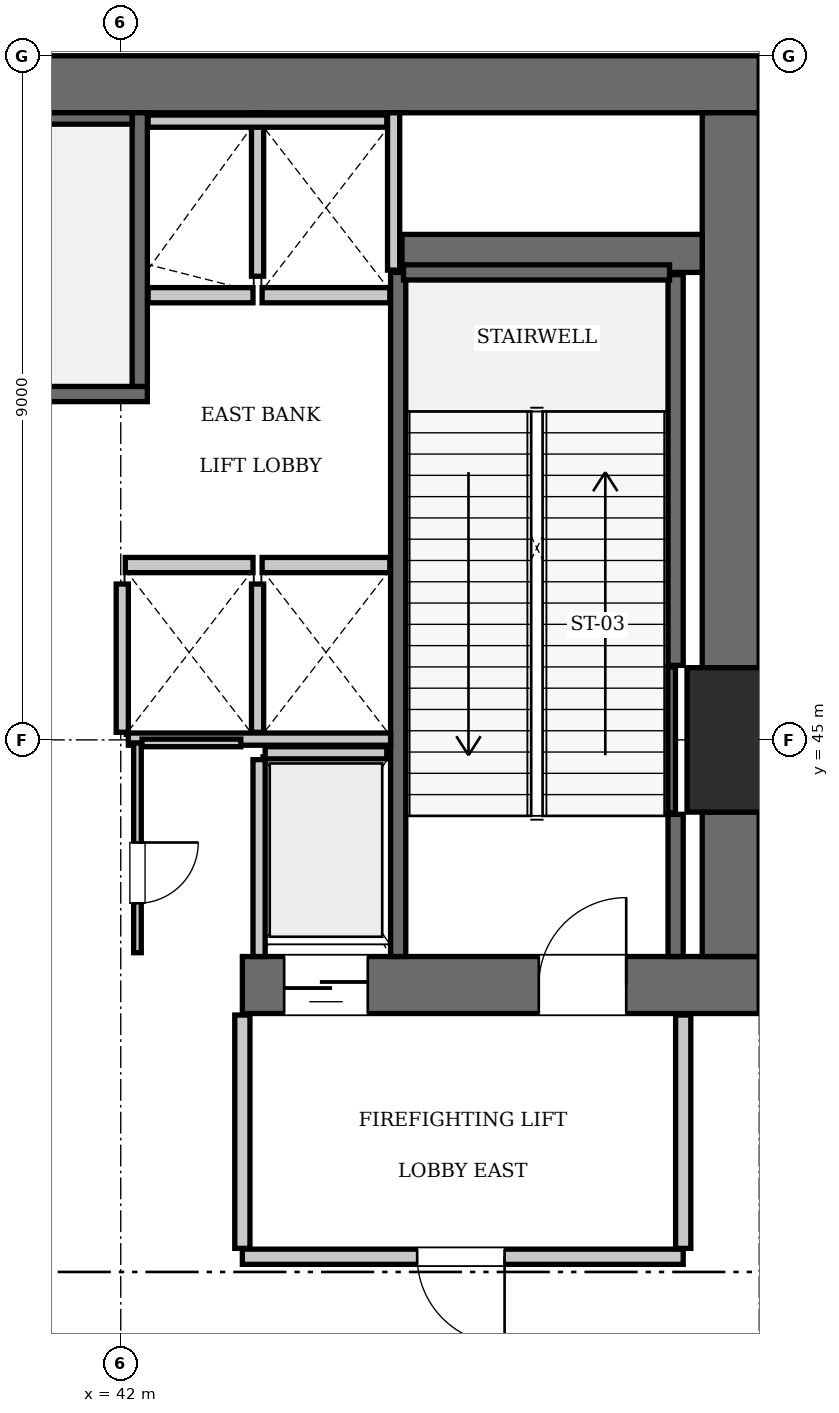
"""IFC4 building model, lengths in metres.
Left out: names, types, materials, properties, quantities, classifications, styles, units other than length and angle.
Written with IfcOpenShell. Run it as: python <this file> out.ifc"""

import sys

from ifc_helpers import new_model, si_unit, direction, frame, frame_2d, origin, origin_2d, place, context, subcontext, project, spatial, rectangle, extrude, element, fill, save


model = new_model("IFC4")
c1 = context("Model", 3, precision=1e-05, world=origin(), true_north=direction((0.0, 1.0)))
c2 = subcontext(c1, "Body", "Model", "MODEL_VIEW")
j1 = project(units=[si_unit("LENGTHUNIT", "METRE"), si_unit("PLANEANGLEUNIT", "RADIAN")], contexts=[c1])
p1 = place(None, origin())
s1 = spatial("IfcSite", under=j1, at=p1, CompositionType="ELEMENT")
p2 = place(p1, origin())
s2 = spatial("IfcBuilding", under=s1, at=p2, CompositionType="ELEMENT")
p3 = place(p2, frame((0.0, 0.0, 227.5)))
s3 = spatial("IfcBuildingStorey", under=s2, at=p3, CompositionType="ELEMENT", Elevation=227.5)
p4 = place(p3, frame((50.4, 45.0, 0.0), z_axis=(0.0, 0.0, 1.0), x_axis=(1.0, 0.0, 0.0)))
e1 = element("IfcColumn", 1, at=p4, inside=s3, PredefinedType="COLUMN", context=c2, shape_type="SweptSolid", body=[
    extrude(rectangle(XDim=1.9, YDim=1.9, at=origin_2d()), origin(), (0.0, 0.0, 1.0), 7.0),
])
p5 = place(p3, frame((25.2, 53.625, 0.0), z_axis=(0.0, 0.0, 1.0), x_axis=(1.0, 0.0, 0.0)))
e2 = element("IfcWall", 2, at=p5, inside=s3, PredefinedType="SHEAR", context=c2, shape_type="SweptSolid", body=[
    extrude(rectangle(XDim=25.2, YDim=0.75, at=frame_2d((12.6, 0.0))), origin(), (0.0, 0.0, 1.0), 7.0),
])
p6 = place(p3, frame((43.6, 41.775, 0.0), z_axis=(0.0, 0.0, 1.0), x_axis=(1.0, 0.0, 0.0)))
e3 = element("IfcWall", 3, at=p6, inside=s3, PredefinedType="SHEAR", context=c2, shape_type="SweptSolid", body=[
    extrude(rectangle(XDim=6.8, YDim=0.75, at=frame_2d((3.4, 0.0))), origin(), (0.0, 0.0, 1.0), 7.0),
])
p7 = place(p6, frame((3.9, 0.0, 0.0)))
e4 = element("IfcOpeningElement", 4, at=p7, cuts=e3, PredefinedType="OPENING", context=c2, shape_type="SweptSolid", body=[
    extrude(rectangle(XDim=1.15, YDim=2.15, at=frame_2d((0.575, 1.075))), frame((0.0, 0.385, 0.0), z_axis=(0.0, -1.0, 0.0), x_axis=(1.0, 0.0, 0.0)), (0.0, 0.0, 1.0), 0.77),
])
p8 = place(p6, frame((0.55, 0.0, 0.0)))
e5 = element("IfcOpeningElement", 5, at=p8, cuts=e3, PredefinedType="OPENING", context=c2, shape_type="SweptSolid", body=[
    extrude(rectangle(XDim=1.1, YDim=2.2, at=frame_2d((0.55, 1.1))), frame((0.0, 0.385, 0.0), z_axis=(0.0, -1.0, 0.0), x_axis=(1.0, 0.0, 0.0)), (0.0, 0.0, 1.0), 0.77),
])
p9 = place(p3, frame((50.025, 42.15, 0.0), z_axis=(0.0, 0.0, 1.0), x_axis=(0.0, 1.0, 0.0)))
e6 = element("IfcWall", 6, at=p9, inside=s3, PredefinedType="SHEAR", context=c2, shape_type="SweptSolid", body=[
    extrude(rectangle(XDim=1.9, YDim=0.75, at=frame_2d((0.95, 0.0))), origin(), (0.0, 0.0, 1.0), 7.0),
])
p10 = place(p3, frame((50.025, 45.95, 0.0), z_axis=(0.0, 0.0, 1.0), x_axis=(0.0, 1.0, 0.0)))
e7 = element("IfcWall", 7, at=p10, inside=s3, PredefinedType="SHEAR", context=c2, shape_type="SweptSolid", body=[
    extrude(rectangle(XDim=7.3, YDim=0.75, at=frame_2d((3.65, 0.0))), origin(), (0.0, 0.0, 1.0), 7.0),
])
p11 = place(p3, frame((45.7, 51.4, 0.0), z_axis=(0.0, 0.0, 1.0), x_axis=(1.0, 0.0, 0.0)))
e8 = element("IfcWall", 8, at=p11, inside=s3, PredefinedType="SHEAR", context=c2, shape_type="SweptSolid", body=[
    extrude(rectangle(XDim=3.95, YDim=0.5, at=frame_2d((1.975, 0.0))), origin(), (0.0, 0.0, 1.0), 7.0),
])
p12 = place(p3, frame((33.25, 49.55, 0.0), z_axis=(0.0, 0.0, 1.0), x_axis=(1.0, 0.0, 0.0)))
e9 = element("IfcWall", 9, at=p12, inside=s3, PredefinedType="SOLIDWALL", context=c2, shape_type="SweptSolid", body=[
    extrude(rectangle(XDim=9.1, YDim=0.2, at=frame_2d((4.55, 0.0))), origin(), (0.0, 0.0, 1.0), 6.76),
])
p13 = place(p3, frame((42.25, 49.65, 0.0), z_axis=(0.0, 0.0, 1.0), x_axis=(0.0, 1.0, 0.0)))
e10 = element("IfcWall", 10, at=p13, inside=s3, PredefinedType="SOLIDWALL", context=c2, shape_type="SweptSolid", body=[
    extrude(rectangle(XDim=3.6, YDim=0.2, at=frame_2d((1.8, 0.0))), origin(), (0.0, 0.0, 1.0), 6.76),
])
p14 = place(p3, frame((33.45, 53.175, 0.0), z_axis=(0.0, 0.0, 1.0), x_axis=(1.0, 0.0, 0.0)))
e11 = element("IfcWall", 11, at=p14, inside=s3, PredefinedType="SOLIDWALL", context=c2, shape_type="SweptSolid", body=[
    extrude(rectangle(XDim=8.7, YDim=0.15, at=frame_2d((4.35, 0.0))), origin(), (0.0, 0.0, 1.0), 6.76),
])
p15 = place(p3, frame((45.65, 42.15, 0.0), z_axis=(0.0, 0.0, 1.0), x_axis=(0.0, 1.0, 0.0)))
e12 = element("IfcWall", 12, at=p15, inside=s3, PredefinedType="SOLIDWALL", context=c2, shape_type="SweptSolid", body=[
    extrude(rectangle(XDim=9.0, YDim=0.2, at=frame_2d((4.5, 0.0))), origin(), (0.0, 0.0, 1.0), 6.76),
])
p16 = place(p3, frame((49.3, 42.15, 0.0), z_axis=(0.0, 0.0, 1.0), x_axis=(0.0, 1.0, 0.0)))
e13 = element("IfcWall", 13, at=p16, inside=s3, PredefinedType="SOLIDWALL", context=c2, shape_type="SweptSolid", body=[
    extrude(rectangle(XDim=1.87, YDim=0.2, at=frame_2d((0.935, 0.0))), origin(), (0.0, 0.0, 1.0), 6.76),
])
p17 = place(p3, frame((49.3, 45.98, 0.0), z_axis=(0.0, 0.0, 1.0), x_axis=(0.0, 1.0, 0.0)))
e14 = element("IfcWall", 14, at=p17, inside=s3, PredefinedType="SOLIDWALL", context=c2, shape_type="SweptSolid", body=[
    extrude(rectangle(XDim=5.14, YDim=0.2, at=frame_2d((2.57, 0.0))), origin(), (0.0, 0.0, 1.0), 6.76),
])
p18 = place(p3, frame((45.72, 51.15, 0.0), z_axis=(0.0, 0.0, 1.0), x_axis=(1.0, 0.0, 0.0)))
e15 = element("IfcWall", 15, at=p18, inside=s3, PredefinedType="SOLIDWALL", context=c2, shape_type="SweptSolid", body=[
    extrude(rectangle(XDim=3.5, YDim=0.2, at=frame_2d((1.75, 0.0))), origin(), (0.0, 0.0, 1.0), 6.76),
])
p19 = place(p3, frame((49.248, 44.04, 0.0), z_axis=(0.0, 0.0, 1.0), x_axis=(0.0, 1.0, 0.0)))
e16 = element("IfcWall", 16, at=p19, inside=s3, PredefinedType="SOLIDWALL", context=c2, shape_type="SweptSolid", body=[
    extrude(rectangle(XDim=1.92, YDim=0.1, at=frame_2d((0.96, 0.0))), origin(), (0.0, 0.0, 1.0), 6.76),
])
for number, where, z_axis, x_axis in (
    (17, (42.06, 47.3, 0.0), (0.0, 0.0, 1.0), (1.0, 0.0, 0.0)),
    (18, (43.86, 47.3, 0.0), (0.0, 0.0, 1.0), (1.0, 0.0, 0.0)),
):
    element("IfcWall", number, at=place(p3, frame(where, z_axis=z_axis, x_axis=x_axis)), inside=s3, PredefinedType="SOLIDWALL", context=c2, shape_type="SweptSolid", body=[
        extrude(rectangle(XDim=1.68, YDim=0.2, at=frame_2d((0.84, 0.0))), origin(), (0.0, 0.0, 1.0), 6.76),
    ])
p20 = place(p3, frame((42.36, 50.85, 0.0), z_axis=(0.0, 0.0, 1.0), x_axis=(1.0, 0.0, 0.0)))
e19 = element("IfcWall", 19, at=p20, inside=s3, PredefinedType="SOLIDWALL", context=c2, shape_type="SweptSolid", body=[
    extrude(rectangle(XDim=1.38, YDim=0.2, at=frame_2d((0.69, 0.0))), origin(), (0.0, 0.0, 1.0), 6.76),
])
p21 = place(p3, frame((43.86, 50.85, 0.0), z_axis=(0.0, 0.0, 1.0), x_axis=(1.0, 0.0, 0.0)))
e20 = element("IfcWall", 20, at=p21, inside=s3, PredefinedType="SOLIDWALL", context=c2, shape_type="SweptSolid", body=[
    extrude(rectangle(XDim=1.68, YDim=0.2, at=frame_2d((0.84, 0.0))), origin(), (0.0, 0.0, 1.0), 6.76),
])
p22 = place(p3, frame((43.9, 44.83, 0.0), z_axis=(0.0, 0.0, 1.0), x_axis=(1.0, 0.0, 0.0)))
e21 = element("IfcWall", 21, at=p22, inside=s3, PredefinedType="SOLIDWALL", context=c2, shape_type="SweptSolid", body=[
    extrude(rectangle(XDim=1.6, YDim=0.16, at=frame_2d((0.8, 0.0))), origin(), (0.0, 0.0, 1.0), 6.76),
])
p23 = place(p3, frame((43.82, 42.15, 0.0), z_axis=(0.0, 0.0, 1.0), x_axis=(0.0, 1.0, 0.0)))
e22 = element("IfcWall", 22, at=p23, inside=s3, PredefinedType="SOLIDWALL", context=c2, shape_type="SweptSolid", body=[
    extrude(rectangle(XDim=2.59, YDim=0.16, at=frame_2d((1.295, 0.0))), origin(), (0.0, 0.0, 1.0), 6.76),
])
for number, where, z_axis, x_axis in (
    (23, (42.02, 45.1, 0.0), (0.0, 0.0, 1.0), (0.0, 1.0, 0.0)),
    (24, (43.8, 45.1, 0.0), (0.0, 0.0, 1.0), (0.0, 1.0, 0.0)),
):
    element("IfcWall", number, at=place(p3, frame(where, z_axis=z_axis, x_axis=x_axis)), inside=s3, PredefinedType="SOLIDWALL", context=c2, shape_type="SweptSolid", body=[
        extrude(rectangle(XDim=1.95, YDim=0.16, at=frame_2d((0.975, 0.0))), origin(), (0.0, 0.0, 1.0), 6.76),
    ])
p24 = place(p3, frame((42.1, 45.01, 0.0), z_axis=(0.0, 0.0, 1.0), x_axis=(1.0, 0.0, 0.0)))
e25 = element("IfcWall", 25, at=p24, inside=s3, PredefinedType="SOLIDWALL", context=c2, shape_type="SweptSolid", body=[
    extrude(rectangle(XDim=3.45, YDim=0.16, at=frame_2d((1.725, 0.0))), origin(), (0.0, 0.0, 1.0), 6.76),
])
p25 = place(p3, frame((45.59, 51.18, 0.0), z_axis=(0.0, 0.0, 1.0), x_axis=(0.0, 1.0, 0.0)))
e26 = element("IfcWall", 26, at=p25, inside=s3, PredefinedType="SOLIDWALL", context=c2, shape_type="SweptSolid", body=[
    extrude(rectangle(XDim=2.07, YDim=0.16, at=frame_2d((1.035, 0.0))), origin(), (0.0, 0.0, 1.0), 6.76),
])
p26 = place(p3, frame((43.8, 51.1, 0.0), z_axis=(0.0, 0.0, 1.0), x_axis=(0.0, 1.0, 0.0)))
e27 = element("IfcWall", 27, at=p26, inside=s3, PredefinedType="SOLIDWALL", context=c2, shape_type="SweptSolid", body=[
    extrude(rectangle(XDim=2.15, YDim=0.16, at=frame_2d((1.075, 0.0))), origin(), (0.0, 0.0, 1.0), 6.76),
])
p27 = place(p3, frame((42.36, 53.14, 0.0), z_axis=(0.0, 0.0, 1.0), x_axis=(1.0, 0.0, 0.0)))
e28 = element("IfcWall", 28, at=p27, inside=s3, PredefinedType="SOLIDWALL", context=c2, shape_type="SweptSolid", body=[
    extrude(rectangle(XDim=3.14, YDim=0.16, at=frame_2d((1.57, 0.0))), origin(), (0.0, 0.0, 1.0), 6.76),
])
p28 = place(p3, frame((43.6, 38.2, 0.0), z_axis=(0.0, 0.0, 1.0), x_axis=(1.0, 0.0, 0.0)))
e29 = element("IfcWall", 29, at=p28, inside=s3, PredefinedType="PARTITIONING", context=c2, shape_type="SweptSolid", body=[
    extrude(rectangle(XDim=5.8, YDim=0.2, at=frame_2d((2.9, 0.0))), origin(), (0.0, 0.0, 1.0), 6.76),
])
p29 = place(p28, frame((2.3, 0.0, 0.0)))
e30 = element("IfcOpeningElement", 30, at=p29, cuts=e29, PredefinedType="OPENING", context=c2, shape_type="SweptSolid", body=[
    extrude(rectangle(XDim=1.15, YDim=2.15, at=frame_2d((0.575, 1.075))), frame((0.0, 0.11, 0.0), z_axis=(0.0, -1.0, 0.0), x_axis=(1.0, 0.0, 0.0)), (0.0, 0.0, 1.0), 0.22),
])
for number, where, z_axis, x_axis in (
    (31, (43.6, 38.31, 0.0), (0.0, 0.0, 1.0), (0.0, 1.0, 0.0)),
    (32, (49.4, 38.31, 0.0), (0.0, 0.0, 1.0), (0.0, 1.0, 0.0)),
):
    element("IfcWall", number, at=place(p3, frame(where, z_axis=z_axis, x_axis=x_axis)), inside=s3, PredefinedType="PARTITIONING", context=c2, shape_type="SweptSolid", body=[
        extrude(rectangle(XDim=3.07, YDim=0.2, at=frame_2d((1.535, 0.0))), origin(), (0.0, 0.0, 1.0), 6.76),
    ])
p30 = place(p3, frame((42.22, 42.2, 0.0), z_axis=(0.0, 0.0, 1.0), x_axis=(0.0, 1.0, 0.0)))
e33 = element("IfcWall", 33, at=p30, inside=s3, PredefinedType="PARTITIONING", context=c2, shape_type="SweptSolid", body=[
    extrude(rectangle(XDim=2.76, YDim=0.1, at=frame_2d((1.38, 0.0))), origin(), (0.0, 0.0, 1.0), 6.76),
])
p31 = place(p30, frame((0.65, 0.0, 0.0)))
e34 = element("IfcOpeningElement", 34, at=p31, cuts=e33, PredefinedType="OPENING", context=c2, shape_type="SweptSolid", body=[
    extrude(rectangle(XDim=0.8, YDim=2.05, at=frame_2d((0.4, 1.025))), frame((0.0, 0.06, 0.0), z_axis=(0.0, -1.0, 0.0), x_axis=(1.0, 0.0, 0.0)), (0.0, 0.0, 1.0), 0.12),
])
p32 = place(p3, frame((42.28, 44.96, 0.0), z_axis=(0.0, 0.0, 1.0), x_axis=(1.0, 0.0, 0.0)))
e35 = element("IfcWall", 35, at=p32, inside=s3, PredefinedType="PARTITIONING", context=c2, shape_type="SweptSolid", body=[
    extrude(rectangle(XDim=1.3, YDim=0.1, at=frame_2d((0.65, 0.0))), origin(), (0.0, 0.0, 1.0), 6.76),
])
p33 = place(p7, origin())
e36 = element("IfcDoor", 36, at=p33, inside=s3, OperationType="SINGLE_SWING_RIGHT", PredefinedType="DOOR", context=c2, shape_type="SweptSolid", body=[
    extrude(rectangle(XDim=1.15, YDim=2.15, at=frame_2d((0.575, 1.075))), frame((0.0, 0.025, 0.0), z_axis=(0.0, -1.0, 0.0), x_axis=(1.0, 0.0, 0.0)), (0.0, 0.0, 1.0), 0.05),
])
fill(e4, e36)
p34 = place(p8, frame((1.1, 0.0, 0.0), z_axis=(0.0, 0.0, 1.0), x_axis=(-1.0, 0.0, 0.0)))
e37 = element("IfcDoor", 37, at=p34, inside=s3, OperationType="SLIDING_TO_LEFT", PredefinedType="DOOR", context=c2, shape_type="SweptSolid", body=[
    extrude(rectangle(XDim=1.1, YDim=2.2, at=frame_2d((0.55, 1.1))), frame((0.0, 0.025, 0.0), z_axis=(0.0, -1.0, 0.0), x_axis=(1.0, 0.0, 0.0)), (0.0, 0.0, 1.0), 0.05),
])
fill(e5, e37)
p35 = place(p29, frame((1.15, 0.0, 0.0), z_axis=(0.0, 0.0, 1.0), x_axis=(-1.0, 0.0, 0.0)))
e38 = element("IfcDoor", 38, at=p35, inside=s3, OperationType="SINGLE_SWING_LEFT", PredefinedType="DOOR", context=c2, shape_type="SweptSolid", body=[
    extrude(rectangle(XDim=1.15, YDim=2.15, at=frame_2d((0.575, 1.075))), frame((0.0, 0.025, 0.0), z_axis=(0.0, -1.0, 0.0), x_axis=(1.0, 0.0, 0.0)), (0.0, 0.0, 1.0), 0.05),
])
fill(e30, e38)
p36 = place(p31, frame((0.8, 0.0, 0.0), z_axis=(0.0, 0.0, 1.0), x_axis=(-1.0, 0.0, 0.0)))
e39 = element("IfcDoor", 39, at=p36, inside=s3, OperationType="SINGLE_SWING_LEFT", PredefinedType="DOOR", context=c2, shape_type="SweptSolid", body=[
    extrude(rectangle(XDim=0.8, YDim=2.05, at=frame_2d((0.4, 1.025))), frame((0.0, 0.025, 0.0), z_axis=(0.0, -1.0, 0.0), x_axis=(1.0, 0.0, 0.0)), (0.0, 0.0, 1.0), 0.05),
])
fill(e34, e39)
save(model, sys.argv[1])
